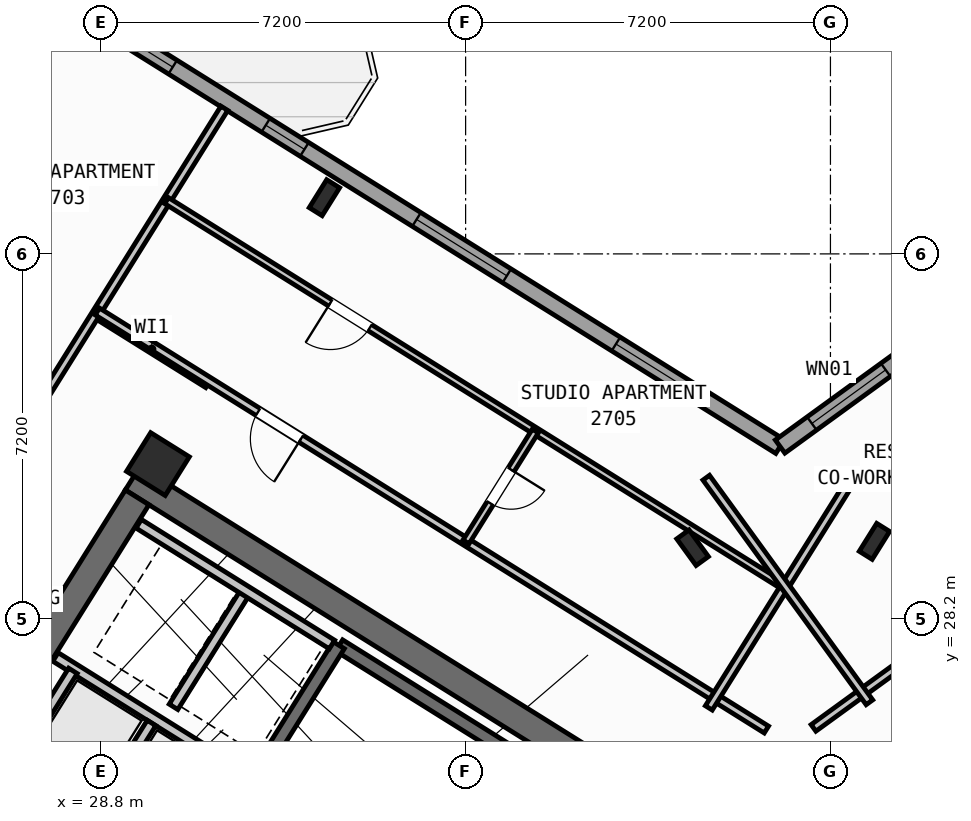
"""IFC4 building model, lengths in metres.
Left out: names, types, materials, properties, quantities, classifications, styles, units other than length and angle.
Written with IfcOpenShell. Run it as: python <this file> out.ifc"""

import sys

from ifc_helpers import new_model, si_unit, direction, frame, frame_2d, origin, origin_2d, place, context, subcontext, project, spatial, rectangle, hollow_rectangle, i_section, extrude, source, transform, mapped, element, fill, save


model = new_model("IFC4")
c1 = context("Model", 3, precision=1e-05, world=origin(), true_north=direction((0.0, 1.0)))
c2 = subcontext(c1, "Body", "Model", "MODEL_VIEW")
j1 = project(units=[si_unit("LENGTHUNIT", "METRE"), si_unit("PLANEANGLEUNIT", "RADIAN")], contexts=[c1])
p1 = place(None, origin())
s1 = spatial("IfcSite", under=j1, at=p1, CompositionType="ELEMENT")
p2 = place(p1, origin())
s2 = spatial("IfcBuilding", under=s1, at=p2, CompositionType="ELEMENT")
p3 = place(p2, frame((0.0, 0.0, 108.9)))
s3 = spatial("IfcBuildingStorey", under=s2, at=p3, CompositionType="ELEMENT", Elevation=108.9)
p4 = place(p3, frame((40.573, 24.01, 0.0), z_axis=(0.0, 0.0, 1.0), x_axis=(-0.848047359947, 0.529920442413, 0.0)))
e1 = element("IfcWall", 1, at=p4, inside=s3, PredefinedType="SHEAR", context=c2, shape_type="SweptSolid", body=[
    extrude(rectangle(XDim=13.14, YDim=0.55, at=frame_2d((6.57, 0.0))), origin(), (0.0, 0.0, 1.0), 3.35),
])
p5 = place(p3, frame((29.517, 30.594, 0.0), z_axis=(0.0, 0.0, 1.0), x_axis=(-0.529906864564, -0.848055844204, 0.0)))
e2 = element("IfcWall", 2, at=p5, inside=s3, PredefinedType="SHEAR", context=c2, shape_type="SweptSolid", body=[
    extrude(rectangle(XDim=3.575, YDim=0.55, at=frame_2d((1.788, 0.0))), origin(), (0.0, 0.0, 1.0), 3.35),
])
p6 = place(p3, frame((44.365, 24.142, 0.0), z_axis=(0.0, 0.0, 1.0), x_axis=(0.809024304885, 0.587775190107, 0.0)))
e3 = element("IfcWall", 3, at=p6, inside=s3, PredefinedType="SHEAR", context=c2, shape_type="SweptSolid", body=[
    extrude(rectangle(XDim=12.34, YDim=0.55, at=frame_2d((6.17, 0.0))), origin(), (0.0, 0.0, 1.0), 3.35),
])
m1 = source(origin(), c2, "Body", "SweptSolid", [
    extrude(i_section(OverallWidth=0.3, OverallDepth=0.65, WebThickness=0.016, FlangeThickness=0.031, at=origin_2d()), origin(), (0.0, 0.0, 1.0), 3.6),
])
for number, where, z_axis, x_axis in (
    (4, (44.068, 29.726, 0.0), (0.0, 0.0, 1.0), (-0.848, 0.53, 0.0)),
    (5, (33.213, 36.509, 0.0), (0.0, 0.0, 1.0), (-0.848, 0.53, 0.0)),
):
    element("IfcColumn", number, at=place(p3, frame(where, z_axis=z_axis, x_axis=x_axis)), inside=s3, PredefinedType="COLUMN", context=c2, shape_type="MappedRepresentation", body=[
        mapped(m1, transform((0.0, 0.0, 0.0), scale=1.0)),
    ])
m2 = source(origin(), c2, "Body", "SweptSolid", [
    extrude(hollow_rectangle(XDim=0.9, YDim=0.9, WallThickness=0.036, at=origin_2d()), origin(), (0.0, 0.0, 1.0), 3.6),
])
p7 = place(p3, frame((29.928, 31.251, 0.0), z_axis=(0.0, 0.0, 1.0), x_axis=(-0.848048096156, 0.529919264233, 0.0)))
e6 = element("IfcColumn", 6, at=p7, inside=s3, PredefinedType="COLUMN", context=c2, shape_type="MappedRepresentation", body=[
    mapped(m2, transform((0.0, 0.0, 0.0), scale=1.0)),
])
p8 = place(p3, frame((40.479, 29.601, 0.0), z_axis=(0.0, 0.0, 1.0), x_axis=(0.809016994375, 0.587785252292, 0.0)))
e7 = element("IfcColumn", 7, at=p8, inside=s3, PredefinedType="COLUMN", context=c2, shape_type="MappedRepresentation", body=[
    mapped(m1, transform((0.0, 0.0, 0.0), scale=1.0)),
])
p9 = place(p3, frame((31.76, 12.183, 0.0), z_axis=(0.0, 0.0, 1.0), x_axis=(-0.848047074256, 0.529920899612, 0.0)))
e8 = element("IfcWall", 8, at=p9, inside=s3, PredefinedType="STANDARD", context=c2, shape_type="SweptSolid", body=[
    extrude(rectangle(XDim=30.652, YDim=0.32, at=frame_2d((15.326, 0.0))), origin(), (0.0, 0.0, 1.0), 3.35),
])
p10 = place(p9, frame((15.153, 0.0, 0.0)))
e9 = element("IfcOpeningElement", 9, at=p10, cuts=e8, PredefinedType="OPENING", context=c2, shape_type="SweptSolid", body=[
    extrude(rectangle(XDim=1.2, YDim=2.15, at=frame_2d((0.6, 1.075))), frame((0.0, 0.17, 0.0), z_axis=(0.0, -1.0, 0.0), x_axis=(1.0, 0.0, 0.0)), (0.0, 0.0, 1.0), 0.34),
])
p11 = place(p9, frame((2.002, 0.0, 0.8)))
e10 = element("IfcOpeningElement", 10, at=p11, cuts=e8, PredefinedType="OPENING", context=c2, shape_type="SweptSolid", body=[
    extrude(rectangle(XDim=2.1, YDim=1.55, at=frame_2d((1.05, 0.775))), frame((0.0, 0.17, 0.0), z_axis=(0.0, -1.0, 0.0), x_axis=(1.0, 0.0, 0.0)), (0.0, 0.0, 1.0), 0.34),
])
p12 = place(p9, frame((7.206, 0.0, 0.8)))
e11 = element("IfcOpeningElement", 11, at=p12, cuts=e8, PredefinedType="OPENING", context=c2, shape_type="SweptSolid", body=[
    extrude(rectangle(XDim=2.1, YDim=1.55, at=frame_2d((1.05, 0.775))), frame((0.0, 0.17, 0.0), z_axis=(0.0, -1.0, 0.0), x_axis=(1.0, 0.0, 0.0)), (0.0, 0.0, 1.0), 0.34),
])
p13 = place(p9, frame((12.648, 0.0, 1.0)))
e12 = element("IfcOpeningElement", 12, at=p13, cuts=e8, PredefinedType="OPENING", context=c2, shape_type="SweptSolid", body=[
    extrude(rectangle(XDim=0.9, YDim=1.25, at=frame_2d((0.45, 0.625))), frame((0.0, 0.17, 0.0), z_axis=(0.0, -1.0, 0.0), x_axis=(1.0, 0.0, 0.0)), (0.0, 0.0, 1.0), 0.34),
])
p14 = place(p9, frame((19.59, 0.0, 0.95)))
e13 = element("IfcOpeningElement", 13, at=p14, cuts=e8, PredefinedType="OPENING", context=c2, shape_type="SweptSolid", body=[
    extrude(rectangle(XDim=1.2, YDim=1.4, at=frame_2d((0.6, 0.7))), frame((0.0, 0.17, 0.0), z_axis=(0.0, -1.0, 0.0), x_axis=(1.0, 0.0, 0.0)), (0.0, 0.0, 1.0), 0.34),
])
p15 = place(p9, frame((25.966, 0.0, 1.0)))
e14 = element("IfcOpeningElement", 14, at=p15, cuts=e8, PredefinedType="OPENING", context=c2, shape_type="SweptSolid", body=[
    extrude(rectangle(XDim=0.9, YDim=1.25, at=frame_2d((0.45, 0.625))), frame((0.0, 0.17, 0.0), z_axis=(0.0, -1.0, 0.0), x_axis=(1.0, 0.0, 0.0)), (0.0, 0.0, 1.0), 0.34),
])
p16 = place(p9, frame((28.871, 0.0, 1.0)))
e15 = element("IfcOpeningElement", 15, at=p16, cuts=e8, PredefinedType="OPENING", context=c2, shape_type="SweptSolid", body=[
    extrude(rectangle(XDim=0.9, YDim=1.25, at=frame_2d((0.45, 0.625))), frame((0.0, 0.17, 0.0), z_axis=(0.0, -1.0, 0.0), x_axis=(1.0, 0.0, 0.0)), (0.0, 0.0, 1.0), 0.34),
])
p17 = place(p3, frame((17.424, 47.083, 0.0), z_axis=(0.0, 0.0, 1.0), x_axis=(0.848049927979, -0.529916332693, 0.0)))
e16 = element("IfcWall", 16, at=p17, inside=s3, PredefinedType="STANDARD", context=c2, shape_type="SweptSolid", body=[
    extrude(rectangle(XDim=29.223, YDim=0.32, at=frame_2d((14.612, 0.0))), origin(), (0.0, 0.0, 1.0), 3.35),
])
p18 = place(p17, frame((3.77, 0.0, 0.0)))
e17 = element("IfcOpeningElement", 17, at=p18, cuts=e16, PredefinedType="OPENING", context=c2, shape_type="SweptSolid", body=[
    extrude(rectangle(XDim=1.05, YDim=2.15, at=frame_2d((0.525, 1.075))), frame((0.0, 0.17, 0.0), z_axis=(0.0, -1.0, 0.0), x_axis=(1.0, 0.0, 0.0)), (0.0, 0.0, 1.0), 0.34),
])
p19 = place(p17, frame((0.9, 0.0, 0.8)))
e18 = element("IfcOpeningElement", 18, at=p19, cuts=e16, PredefinedType="OPENING", context=c2, shape_type="SweptSolid", body=[
    extrude(rectangle(XDim=2.1, YDim=1.55, at=frame_2d((1.05, 0.775))), frame((0.0, 0.17, 0.0), z_axis=(0.0, -1.0, 0.0), x_axis=(1.0, 0.0, 0.0)), (0.0, 0.0, 1.0), 0.34),
])
p20 = place(p17, frame((6.972, 0.0, 1.0)))
e19 = element("IfcOpeningElement", 19, at=p20, cuts=e16, PredefinedType="OPENING", context=c2, shape_type="SweptSolid", body=[
    extrude(rectangle(XDim=0.9, YDim=1.25, at=frame_2d((0.45, 0.625))), frame((0.0, 0.17, 0.0), z_axis=(0.0, -1.0, 0.0), x_axis=(1.0, 0.0, 0.0)), (0.0, 0.0, 1.0), 0.34),
])
p21 = place(p17, frame((9.847, 0.0, 0.85)))
e20 = element("IfcOpeningElement", 20, at=p21, cuts=e16, PredefinedType="OPENING", context=c2, shape_type="SweptSolid", body=[
    extrude(rectangle(XDim=1.5, YDim=1.5, at=frame_2d((0.75, 0.75))), frame((0.0, 0.17, 0.0), z_axis=(0.0, -1.0, 0.0), x_axis=(1.0, 0.0, 0.0)), (0.0, 0.0, 1.0), 0.34),
])
p22 = place(p17, frame((13.889, 0.0, 0.95)))
e21 = element("IfcOpeningElement", 21, at=p22, cuts=e16, PredefinedType="OPENING", context=c2, shape_type="SweptSolid", body=[
    extrude(rectangle(XDim=1.2, YDim=1.4, at=frame_2d((0.6, 0.7))), frame((0.0, 0.17, 0.0), z_axis=(0.0, -1.0, 0.0), x_axis=(1.0, 0.0, 0.0)), (0.0, 0.0, 1.0), 0.34),
])
p23 = place(p17, frame((17.254, 0.0, 1.0)))
e22 = element("IfcOpeningElement", 22, at=p23, cuts=e16, PredefinedType="OPENING", context=c2, shape_type="SweptSolid", body=[
    extrude(rectangle(XDim=0.9, YDim=1.25, at=frame_2d((0.45, 0.625))), frame((0.0, 0.17, 0.0), z_axis=(0.0, -1.0, 0.0), x_axis=(1.0, 0.0, 0.0)), (0.0, 0.0, 1.0), 0.34),
])
p24 = place(p17, frame((20.764, 0.0, 0.8)))
e23 = element("IfcOpeningElement", 23, at=p24, cuts=e16, PredefinedType="OPENING", context=c2, shape_type="SweptSolid", body=[
    extrude(rectangle(XDim=2.1, YDim=1.55, at=frame_2d((1.05, 0.775))), frame((0.0, 0.17, 0.0), z_axis=(0.0, -1.0, 0.0), x_axis=(1.0, 0.0, 0.0)), (0.0, 0.0, 1.0), 0.34),
])
p25 = place(p17, frame((25.403, 0.0, 0.8)))
e24 = element("IfcOpeningElement", 24, at=p25, cuts=e16, PredefinedType="OPENING", context=c2, shape_type="SweptSolid", body=[
    extrude(rectangle(XDim=2.1, YDim=1.55, at=frame_2d((1.05, 0.775))), frame((0.0, 0.17, 0.0), z_axis=(0.0, -1.0, 0.0), x_axis=(1.0, 0.0, 0.0)), (0.0, 0.0, 1.0), 0.34),
])
p26 = place(p3, frame((42.207, 31.597, 0.0), z_axis=(0.0, 0.0, 1.0), x_axis=(0.809020333377, 0.587780656523, 0.0)))
e25 = element("IfcWall", 25, at=p26, inside=s3, PredefinedType="STANDARD", context=c2, shape_type="SweptSolid", body=[
    extrude(rectangle(XDim=15.223, YDim=0.32, at=frame_2d((7.611, 0.0))), origin(), (0.0, 0.0, 1.0), 3.35),
])
p27 = place(p26, frame((12.82, 0.0, 0.0)))
e26 = element("IfcOpeningElement", 26, at=p27, cuts=e25, PredefinedType="OPENING", context=c2, shape_type="SweptSolid", body=[
    extrude(rectangle(XDim=1.05, YDim=2.15, at=frame_2d((0.525, 1.075))), frame((0.0, 0.17, 0.0), z_axis=(0.0, -1.0, 0.0), x_axis=(1.0, 0.0, 0.0)), (0.0, 0.0, 1.0), 0.34),
])
p28 = place(p26, frame((0.775, 0.0, 0.85)))
e27 = element("IfcOpeningElement", 27, at=p28, cuts=e25, PredefinedType="OPENING", context=c2, shape_type="SweptSolid", body=[
    extrude(rectangle(XDim=1.8, YDim=1.5, at=frame_2d((0.9, 0.75))), frame((0.0, 0.17, 0.0), z_axis=(0.0, -1.0, 0.0), x_axis=(1.0, 0.0, 0.0)), (0.0, 0.0, 1.0), 0.34),
])
p29 = place(p26, frame((5.544, 0.0, 0.85)))
e28 = element("IfcOpeningElement", 28, at=p29, cuts=e25, PredefinedType="OPENING", context=c2, shape_type="SweptSolid", body=[
    extrude(rectangle(XDim=1.8, YDim=1.5, at=frame_2d((0.9, 0.75))), frame((0.0, 0.17, 0.0), z_axis=(0.0, -1.0, 0.0), x_axis=(1.0, 0.0, 0.0)), (0.0, 0.0, 1.0), 0.34),
])
p30 = place(p26, frame((10.219, 0.0, 1.0)))
e29 = element("IfcOpeningElement", 29, at=p30, cuts=e25, PredefinedType="OPENING", context=c2, shape_type="SweptSolid", body=[
    extrude(rectangle(XDim=0.9, YDim=1.25, at=frame_2d((0.45, 0.625))), frame((0.0, 0.17, 0.0), z_axis=(0.0, -1.0, 0.0), x_axis=(1.0, 0.0, 0.0)), (0.0, 0.0, 1.0), 0.34),
])
p31 = place(p3, frame((39.721, 23.788, 0.0), z_axis=(0.0, 0.0, 1.0), x_axis=(-0.848054434086, 0.529909121291, 0.0)))
e30 = element("IfcWall", 30, at=p31, inside=s3, PredefinedType="SHEAR", context=c2, shape_type="SweptSolid", body=[
    extrude(rectangle(XDim=7.33, YDim=0.26, at=frame_2d((3.665, 0.0))), origin(), (0.0, 0.0, 1.0), 3.35),
])
p32 = place(p3, frame((33.496, 27.677, 0.0), z_axis=(0.0, 0.0, 1.0), x_axis=(-0.529908658664, -0.84805472316, 0.0)))
e31 = element("IfcWall", 31, at=p32, inside=s3, PredefinedType="SHEAR", context=c2, shape_type="SweptSolid", body=[
    extrude(rectangle(XDim=3.16, YDim=0.26, at=frame_2d((1.58, 0.0))), origin(), (0.0, 0.0, 1.0), 3.35),
])
p33 = place(p3, frame((31.822, 24.998, 0.0), z_axis=(0.0, 0.0, 1.0), x_axis=(-0.848036912365, 0.52993716162, 0.0)))
e32 = element("IfcWall", 32, at=p33, inside=s3, PredefinedType="STANDARD", context=c2, shape_type="SweptSolid", body=[
    extrude(rectangle(XDim=4.618, YDim=0.2, at=frame_2d((2.309, 0.0))), origin(), (0.0, 0.0, 1.0), 3.34),
])
p34 = place(p3, frame((32.108, 22.814, 0.0), z_axis=(0.0, 0.0, 1.0), x_axis=(-0.848042229521, 0.529928652696, 0.0)))
e33 = element("IfcWall", 33, at=p34, inside=s3, PredefinedType="STANDARD", context=c2, shape_type="SweptSolid", body=[
    extrude(rectangle(XDim=5.62, YDim=0.2, at=frame_2d((2.81, 0.0))), origin(), (0.0, 0.0, 1.0), 3.34),
])
p35 = place(p34, frame((0.39, 0.0, 0.0)))
e34 = element("IfcOpeningElement", 34, at=p35, cuts=e33, PredefinedType="OPENING", context=c2, shape_type="SweptSolid", body=[
    extrude(rectangle(XDim=1.1, YDim=2.15, at=frame_2d((0.55, 1.075))), frame((0.0, 0.11, 0.0), z_axis=(0.0, -1.0, 0.0), x_axis=(1.0, 0.0, 0.0)), (0.0, 0.0, 1.0), 0.22),
])
p36 = place(p34, frame((2.25, 0.0, 0.0)))
e35 = element("IfcOpeningElement", 35, at=p36, cuts=e33, PredefinedType="OPENING", context=c2, shape_type="SweptSolid", body=[
    extrude(rectangle(XDim=1.1, YDim=2.15, at=frame_2d((0.55, 1.075))), frame((0.0, 0.11, 0.0), z_axis=(0.0, -1.0, 0.0), x_axis=(1.0, 0.0, 0.0)), (0.0, 0.0, 1.0), 0.22),
])
p37 = place(p34, frame((4.11, 0.0, 0.0)))
e36 = element("IfcOpeningElement", 36, at=p37, cuts=e33, PredefinedType="OPENING", context=c2, shape_type="SweptSolid", body=[
    extrude(rectangle(XDim=1.1, YDim=2.15, at=frame_2d((0.55, 1.075))), frame((0.0, 0.11, 0.0), z_axis=(0.0, -1.0, 0.0), x_axis=(1.0, 0.0, 0.0)), (0.0, 0.0, 1.0), 0.22),
])
p38 = place(p3, frame((28.25, 27.17, 0.0), z_axis=(0.0, 0.0, 1.0), x_axis=(-0.529905827651, -0.848056492117, 0.0)))
e37 = element("IfcWall", 37, at=p38, inside=s3, PredefinedType="STANDARD", context=c2, shape_type="SweptSolid", body=[
    extrude(rectangle(XDim=1.65, YDim=0.2, at=frame_2d((0.825, 0.0))), origin(), (0.0, 0.0, 1.0), 3.34),
])
p39 = place(p3, frame((31.645, 28.716, 0.0), z_axis=(0.0, 0.0, 1.0), x_axis=(-0.52986693015, -0.848080795876, 0.0)))
e38 = element("IfcWall", 38, at=p39, inside=s3, PredefinedType="STANDARD", context=c2, shape_type="SweptSolid", body=[
    extrude(rectangle(XDim=2.66, YDim=0.2, at=frame_2d((1.33, 0.0))), origin(), (0.0, 0.0, 1.0), 3.34),
])
p40 = place(p3, frame((33.363, 27.69, 0.0), z_axis=(0.0, 0.0, 1.0), x_axis=(-0.848047090064, 0.529920874315, 0.0)))
e39 = element("IfcWall", 39, at=p40, inside=s3, PredefinedType="STANDARD", context=c2, shape_type="SweptSolid", body=[
    extrude(rectangle(XDim=4.498, YDim=0.2, at=frame_2d((2.249, 0.0))), origin(), (0.0, 0.0, 1.0), 3.34),
])
p41 = place(p3, frame((29.801, 26.142, 0.0), z_axis=(0.0, 0.0, 1.0), x_axis=(-0.529998940003, -0.847998304005, 0.0)))
e40 = element("IfcWall", 40, at=p41, inside=s3, PredefinedType="STANDARD", context=c2, shape_type="SweptSolid", body=[
    extrude(rectangle(XDim=1.58, YDim=0.2, at=frame_2d((0.79, 0.0))), origin(), (0.0, 0.0, 1.0), 3.34),
])
p42 = place(p3, frame((30.914, 32.829, 0.0), z_axis=(0.0, 0.0, 1.0), x_axis=(-0.848008813643, 0.529982124211, 0.0)))
e41 = element("IfcWall", 41, at=p42, inside=s3, PredefinedType="PARTITIONING", context=c2, shape_type="SweptSolid", body=[
    extrude(rectangle(XDim=2.61, YDim=0.16, at=frame_2d((1.305, 0.0))), origin(), (0.0, 0.0, 1.0), 3.34),
])
p43 = place(p3, frame((31.239, 38.274, 0.0), z_axis=(0.0, 0.0, 1.0), x_axis=(-0.529925472745, -0.848044216616, 0.0)))
e42 = element("IfcWall", 42, at=p43, inside=s3, PredefinedType="PARTITIONING", context=c2, shape_type="SweptSolid", body=[
    extrude(rectangle(XDim=11.65, YDim=0.16, at=frame_2d((5.825, 0.0))), origin(), (0.0, 0.0, 1.0), 3.34),
])
p44 = place(p3, frame((41.936, 26.012, 0.0), z_axis=(0.0, 0.0, 1.0), x_axis=(-0.848051154596, 0.529914369676, 0.0)))
e43 = element("IfcWall", 43, at=p44, inside=s3, PredefinedType="PARTITIONING", context=c2, shape_type="SweptSolid", body=[
    extrude(rectangle(XDim=15.57, YDim=0.16, at=frame_2d((7.785, 0.0))), origin(), (0.0, 0.0, 1.0), 3.34),
])
p45 = place(p44, frame((10.83, 0.0, 0.0)))
e44 = element("IfcOpeningElement", 44, at=p45, cuts=e43, PredefinedType="OPENING", context=c2, shape_type="SweptSolid", body=[
    extrude(rectangle(XDim=1.0, YDim=2.1, at=frame_2d((0.5, 1.05))), frame((0.0, 0.09, 0.0), z_axis=(0.0, -1.0, 0.0), x_axis=(1.0, 0.0, 0.0)), (0.0, 0.0, 1.0), 0.18),
])
p46 = place(p3, frame((43.704, 31.086, 0.0), z_axis=(0.0, 0.0, 1.0), x_axis=(-0.529906828443, -0.848055866774, 0.0)))
e45 = element("IfcWall", 45, at=p46, inside=s3, PredefinedType="PARTITIONING", context=c2, shape_type="SweptSolid", body=[
    extrude(rectangle(XDim=5.48, YDim=0.16, at=frame_2d((2.74, 0.0))), origin(), (0.0, 0.0, 1.0), 3.34),
])
p47 = place(p3, frame((42.226, 28.873, 0.0), z_axis=(0.0, 0.0, 1.0), x_axis=(-0.848049134363, 0.529917602752, 0.0)))
e46 = element("IfcWall", 46, at=p47, inside=s3, PredefinedType="PLUMBINGWALL", context=c2, shape_type="SweptSolid", body=[
    extrude(rectangle(XDim=14.3, YDim=0.14, at=frame_2d((7.15, 0.0))), origin(), (0.0, 0.0, 1.0), 3.34),
])
p48 = place(p47, frame((9.57, 0.0, 0.0)))
e47 = element("IfcOpeningElement", 47, at=p48, cuts=e46, PredefinedType="OPENING", context=c2, shape_type="SweptSolid", body=[
    extrude(rectangle(XDim=0.92, YDim=2.08, at=frame_2d((0.46, 1.04))), frame((0.0, 0.08, 0.0), z_axis=(0.0, -1.0, 0.0), x_axis=(1.0, 0.0, 0.0)), (0.0, 0.0, 1.0), 0.16),
])
p49 = place(p3, frame((37.375, 31.904, 0.0), z_axis=(0.0, 0.0, 1.0), x_axis=(-0.529913878929, -0.848051461244, 0.0)))
e48 = element("IfcWall", 48, at=p49, inside=s3, PredefinedType="PLUMBINGWALL", context=c2, shape_type="SweptSolid", body=[
    extrude(rectangle(XDim=2.58, YDim=0.14, at=frame_2d((1.29, 0.0))), origin(), (0.0, 0.0, 1.0), 3.34),
])
p50 = place(p49, frame((0.9, 0.0, 0.0)))
e49 = element("IfcOpeningElement", 49, at=p50, cuts=e48, PredefinedType="OPENING", context=c2, shape_type="SweptSolid", body=[
    extrude(rectangle(XDim=0.78, YDim=2.05, at=frame_2d((0.39, 1.025))), frame((0.0, 0.08, 0.0), z_axis=(0.0, -1.0, 0.0), x_axis=(1.0, 0.0, 0.0)), (0.0, 0.0, 1.0), 0.16),
])
p51 = place(p3, frame((42.866, 26.044, 0.0), z_axis=(0.0, 0.0, 1.0), x_axis=(0.809020254154, 0.587780765566, 0.0)))
e50 = element("IfcWall", 50, at=p51, inside=s3, PredefinedType="PARTITIONING", context=c2, shape_type="SweptSolid", body=[
    extrude(rectangle(XDim=14.67, YDim=0.16, at=frame_2d((7.335, 0.0))), origin(), (0.0, 0.0, 1.0), 3.34),
])
p52 = place(p51, frame((3.215, 0.0, 0.0)))
e51 = element("IfcOpeningElement", 51, at=p52, cuts=e50, PredefinedType="OPENING", context=c2, shape_type="SweptSolid", body=[
    extrude(rectangle(XDim=1.0, YDim=2.1, at=frame_2d((0.5, 1.05))), frame((0.0, 0.09, 0.0), z_axis=(0.0, -1.0, 0.0), x_axis=(1.0, 0.0, 0.0)), (0.0, 0.0, 1.0), 0.18),
])
p53 = place(p51, frame((9.915, 0.0, 0.0)))
e52 = element("IfcOpeningElement", 52, at=p53, cuts=e50, PredefinedType="OPENING", context=c2, shape_type="SweptSolid", body=[
    extrude(rectangle(XDim=1.0, YDim=2.1, at=frame_2d((0.5, 1.05))), frame((0.0, 0.09, 0.0), z_axis=(0.0, -1.0, 0.0), x_axis=(1.0, 0.0, 0.0)), (0.0, 0.0, 1.0), 0.18),
])
p54 = place(p3, frame((43.969, 26.55, 0.0), z_axis=(0.0, 0.0, 1.0), x_axis=(-0.587776919386, 0.80902304852, 0.0)))
e53 = element("IfcWall", 53, at=p54, inside=s3, PredefinedType="PARTITIONING", context=c2, shape_type="SweptSolid", body=[
    extrude(rectangle(XDim=5.48, YDim=0.16, at=frame_2d((2.74, 0.0))), origin(), (0.0, 0.0, 1.0), 3.34),
])
m3 = source(origin(), c2, "Body", "SweptSolid", [
    extrude(rectangle(XDim=1.2, YDim=1.4, at=frame_2d((0.6, 0.7))), frame((0.0, 0.03, 0.0), z_axis=(0.0, -1.0, 0.0), x_axis=(1.0, 0.0, 0.0)), (0.0, 0.0, 1.0), 0.06),
])
p55 = place(p22, origin())
e54 = element("IfcWindow", 54, at=p55, inside=s3, PartitioningType="SINGLE_PANEL", PredefinedType="WINDOW", context=c2, shape_type="MappedRepresentation", body=[
    mapped(m3, transform((0.0, 0.0, 0.0), scale=1.0)),
])
fill(e21, e54)
m4 = source(origin(), c2, "Body", "SweptSolid", [
    extrude(rectangle(XDim=0.9, YDim=1.25, at=frame_2d((0.45, 0.625))), frame((0.0, 0.03, 0.0), z_axis=(0.0, -1.0, 0.0), x_axis=(1.0, 0.0, 0.0)), (0.0, 0.0, 1.0), 0.06),
])
p56 = place(p23, origin())
e55 = element("IfcWindow", 55, at=p56, inside=s3, PartitioningType="SINGLE_PANEL", PredefinedType="WINDOW", context=c2, shape_type="MappedRepresentation", body=[
    mapped(m4, transform((0.0, 0.0, 0.0), scale=1.0)),
])
fill(e22, e55)
m5 = source(origin(), c2, "Body", "SweptSolid", [
    extrude(rectangle(XDim=2.1, YDim=1.55, at=frame_2d((1.05, 0.775))), frame((0.0, 0.03, 0.0), z_axis=(0.0, -1.0, 0.0), x_axis=(1.0, 0.0, 0.0)), (0.0, 0.0, 1.0), 0.06),
])
p57 = place(p24, origin())
e56 = element("IfcWindow", 56, at=p57, inside=s3, PartitioningType="SINGLE_PANEL", PredefinedType="WINDOW", context=c2, shape_type="MappedRepresentation", body=[
    mapped(m5, transform((0.0, 0.0, 0.0), scale=1.0)),
])
fill(e23, e56)
p58 = place(p25, origin())
e57 = element("IfcWindow", 57, at=p58, inside=s3, PartitioningType="SINGLE_PANEL", PredefinedType="WINDOW", context=c2, shape_type="MappedRepresentation", body=[
    mapped(m5, transform((0.0, 0.0, 0.0), scale=1.0)),
])
fill(e24, e57)
m6 = source(origin(), c2, "Body", "SweptSolid", [
    extrude(rectangle(XDim=1.8, YDim=1.5, at=frame_2d((0.9, 0.75))), frame((0.0, 0.03, 0.0), z_axis=(0.0, -1.0, 0.0), x_axis=(1.0, 0.0, 0.0)), (0.0, 0.0, 1.0), 0.06),
])
p59 = place(p28, origin())
e58 = element("IfcWindow", 58, at=p59, inside=s3, PartitioningType="SINGLE_PANEL", PredefinedType="WINDOW", context=c2, shape_type="MappedRepresentation", body=[
    mapped(m6, transform((0.0, 0.0, 0.0), scale=1.0)),
])
fill(e27, e58)
m7 = source(origin(), c2, "Body", "SweptSolid", [
    extrude(rectangle(XDim=1.0, YDim=2.1, at=frame_2d((0.5, 1.05))), frame((0.0, 0.025, 0.0), z_axis=(0.0, -1.0, 0.0), x_axis=(1.0, 0.0, 0.0)), (0.0, 0.0, 1.0), 0.05),
])
p60 = place(p45, origin())
e59 = element("IfcDoor", 59, at=p60, inside=s3, OperationType="SINGLE_SWING_LEFT", PredefinedType="DOOR", context=c2, shape_type="MappedRepresentation", body=[
    mapped(m7, transform((0.0, 0.0, 0.0), scale=1.0)),
])
fill(e44, e59)
m8 = source(origin(), c2, "Body", "SweptSolid", [
    extrude(rectangle(XDim=0.92, YDim=2.08, at=frame_2d((0.46, 1.04))), frame((0.0, 0.025, 0.0), z_axis=(0.0, -1.0, 0.0), x_axis=(1.0, 0.0, 0.0)), (0.0, 0.0, 1.0), 0.05),
])
p61 = place(p48, origin())
e60 = element("IfcDoor", 60, at=p61, inside=s3, OperationType="SINGLE_SWING_RIGHT", PredefinedType="DOOR", context=c2, shape_type="MappedRepresentation", body=[
    mapped(m8, transform((0.0, 0.0, 0.0), scale=1.0)),
])
fill(e47, e60)
m9 = source(origin(), c2, "Body", "SweptSolid", [
    extrude(rectangle(XDim=0.78, YDim=2.05, at=frame_2d((0.39, 1.025))), frame((0.0, 0.025, 0.0), z_axis=(0.0, -1.0, 0.0), x_axis=(1.0, 0.0, 0.0)), (0.0, 0.0, 1.0), 0.05),
])
p62 = place(p50, origin())
e61 = element("IfcDoor", 61, at=p62, inside=s3, OperationType="SINGLE_SWING_LEFT", PredefinedType="DOOR", context=c2, shape_type="MappedRepresentation", body=[
    mapped(m9, transform((0.0, 0.0, 0.0), scale=1.0)),
])
fill(e49, e61)
save(model, sys.argv[1])
